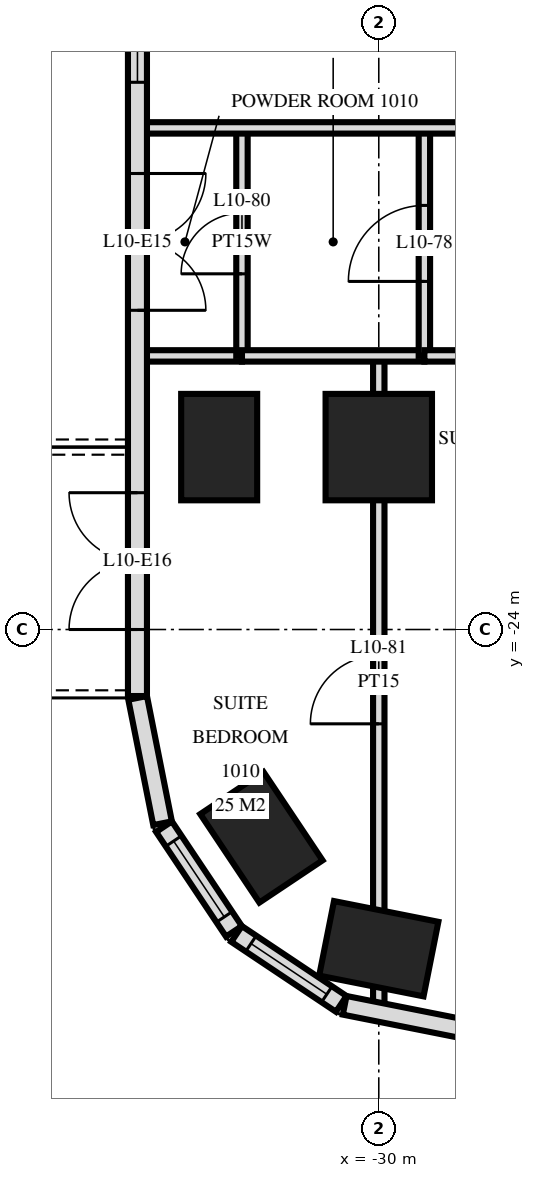
"""IFC4 building model, lengths in metres.
Left out: names, types, materials, properties, quantities, classifications, styles, units other than length and angle.
Written with IfcOpenShell. Run it as: python <this file> out.ifc"""

import sys

from ifc_helpers import new_model, si_unit, direction, frame, frame_2d, origin, origin_2d, place, context, subcontext, project, spatial, rectangle, extrude, element, fill, save


model = new_model("IFC4")
c1 = context("Model", 3, precision=1e-05, world=origin(), true_north=direction((0.0, 1.0)))
c2 = subcontext(c1, "Body", "Model", "MODEL_VIEW")
j1 = project(units=[si_unit("LENGTHUNIT", "METRE"), si_unit("PLANEANGLEUNIT", "RADIAN")], contexts=[c1])
p1 = place(None, origin())
s1 = spatial("IfcSite", under=j1, at=p1, CompositionType="ELEMENT")
p2 = place(p1, origin())
s2 = spatial("IfcBuilding", under=s1, at=p2, CompositionType="ELEMENT")
p3 = place(p2, frame((0.0, 0.0, 45.6)))
s3 = spatial("IfcBuildingStorey", under=s2, at=p3, CompositionType="ELEMENT", Elevation=45.6)
for number, where, z_axis, x_axis in (
    (1, (-32.1, -21.6, 0.0), (0.0, 0.0, 1.0), (0.0, 1.0, 0.0)),
    (2, (-31.544, -26.733, 0.0), (0.0, 0.0, 1.0), (-0.556, 0.831, 0.0)),
    (3, (-30.0, -28.2, 0.0), (0.0, 0.0, 1.0), (-0.981, 0.195, 0.0)),
):
    element("IfcColumn", number, at=place(p3, frame(where, z_axis=z_axis, x_axis=x_axis)), inside=s3, PredefinedType="COLUMN", context=c2, shape_type="SweptSolid", body=[
        extrude(rectangle(XDim=1.4, YDim=1.0, at=origin_2d()), origin(), (0.0, 0.0, 1.0), 3.6),
    ])
p4 = place(p3, frame((-30.0, -21.6, 0.0), z_axis=(0.0, 0.0, 1.0), x_axis=(1.0, 0.0, 0.0)))
e4 = element("IfcColumn", 4, at=p4, inside=s3, PredefinedType="COLUMN", context=c2, shape_type="SweptSolid", body=[
    extrude(rectangle(XDim=1.4, YDim=1.4, at=origin_2d()), origin(), (0.0, 0.0, 1.0), 3.6),
])
p5 = place(p3, frame((-33.175, -3.325, 0.0), z_axis=(0.0, 0.0, 1.0), x_axis=(0.0, -1.0, 0.0)))
e5 = element("IfcWall", 5, at=p5, inside=s3, PredefinedType="SOLIDWALL", context=c2, shape_type="SweptSolid", body=[
    extrude(rectangle(XDim=21.551, YDim=0.25, at=frame_2d((10.775, 0.0))), origin(), (0.0, 0.0, 1.0), 3.32),
])
p6 = place(p5, frame((6.65, 0.0, 0.0)))
e6 = element("IfcOpeningElement", 6, at=p6, cuts=e5, PredefinedType="OPENING", context=c2, shape_type="SweptSolid", body=[
    extrude(rectangle(XDim=1.8, YDim=2.4, at=frame_2d((0.9, 1.2))), frame((0.0, 0.135, 0.0), z_axis=(0.0, -1.0, 0.0), x_axis=(1.0, 0.0, 0.0)), (0.0, 0.0, 1.0), 0.27),
])
p7 = place(p5, frame((12.275, 0.0, 0.3)))
e7 = element("IfcOpeningElement", 7, at=p7, cuts=e5, PredefinedType="OPENING", context=c2, shape_type="SweptSolid", body=[
    extrude(rectangle(XDim=1.2, YDim=2.1, at=frame_2d((0.6, 1.05))), frame((0.0, 0.135, 0.0), z_axis=(0.0, -1.0, 0.0), x_axis=(1.0, 0.0, 0.0)), (0.0, 0.0, 1.0), 0.27),
])
p8 = place(p5, frame((14.675, 0.0, 0.0)))
e8 = element("IfcOpeningElement", 8, at=p8, cuts=e5, PredefinedType="OPENING", context=c2, shape_type="SweptSolid", body=[
    extrude(rectangle(XDim=1.8, YDim=2.4, at=frame_2d((0.9, 1.2))), frame((0.0, 0.135, 0.0), z_axis=(0.0, -1.0, 0.0), x_axis=(1.0, 0.0, 0.0)), (0.0, 0.0, 1.0), 0.27),
])
p9 = place(p5, frame((18.875, 0.0, 0.0)))
e9 = element("IfcOpeningElement", 9, at=p9, cuts=e5, PredefinedType="OPENING", context=c2, shape_type="SweptSolid", body=[
    extrude(rectangle(XDim=1.8, YDim=2.4, at=frame_2d((0.9, 1.2))), frame((0.0, 0.135, 0.0), z_axis=(0.0, -1.0, 0.0), x_axis=(1.0, 0.0, 0.0)), (0.0, 0.0, 1.0), 0.27),
])
p10 = place(p3, frame((-33.173, -24.9, 0.0), z_axis=(0.0, 0.0, 1.0), x_axis=(0.195166572128, -0.980770110232, 0.0)))
e10 = element("IfcWall", 10, at=p10, inside=s3, PredefinedType="SOLIDWALL", context=c2, shape_type="SweptSolid", body=[
    extrude(rectangle(XDim=1.681, YDim=0.25, at=frame_2d((0.841, 0.0))), origin(), (0.0, 0.0, 1.0), 3.32),
])
p11 = place(p3, frame((-32.826, -26.594, 0.0), z_axis=(0.0, 0.0, 1.0), x_axis=(0.55555029066, -0.831482937015, 0.0)))
e11 = element("IfcWall", 11, at=p11, inside=s3, PredefinedType="SOLIDWALL", context=c2, shape_type="SweptSolid", body=[
    extrude(rectangle(XDim=1.656, YDim=0.25, at=frame_2d((0.828, 0.0))), origin(), (0.0, 0.0, 1.0), 3.32),
])
p12 = place(p11, frame((0.228, 0.0, 0.9)))
e12 = element("IfcOpeningElement", 12, at=p12, cuts=e11, PredefinedType="OPENING", context=c2, shape_type="SweptSolid", body=[
    extrude(rectangle(XDim=1.2, YDim=1.5, at=frame_2d((0.6, 0.75))), frame((0.0, 0.135, 0.0), z_axis=(0.0, -1.0, 0.0), x_axis=(1.0, 0.0, 0.0)), (0.0, 0.0, 1.0), 0.27),
])
p13 = place(p3, frame((-31.871, -28.006, 0.0), z_axis=(0.0, 0.0, 1.0), x_axis=(0.831482937015, -0.55555029066, 0.0)))
e13 = element("IfcWall", 13, at=p13, inside=s3, PredefinedType="SOLIDWALL", context=c2, shape_type="SweptSolid", body=[
    extrude(rectangle(XDim=1.656, YDim=0.25, at=frame_2d((0.828, 0.0))), origin(), (0.0, 0.0, 1.0), 3.32),
])
p14 = place(p13, frame((0.228, 0.0, 0.9)))
e14 = element("IfcOpeningElement", 14, at=p14, cuts=e13, PredefinedType="OPENING", context=c2, shape_type="SweptSolid", body=[
    extrude(rectangle(XDim=1.2, YDim=1.5, at=frame_2d((0.6, 0.75))), frame((0.0, 0.135, 0.0), z_axis=(0.0, -1.0, 0.0), x_axis=(1.0, 0.0, 0.0)), (0.0, 0.0, 1.0), 0.27),
])
p15 = place(p3, frame((-30.449, -28.945, 0.0), z_axis=(0.0, 0.0, 1.0), x_axis=(0.980775640221, -0.19513878023, 0.0)))
e15 = element("IfcWall", 15, at=p15, inside=s3, PredefinedType="SOLIDWALL", context=c2, shape_type="SweptSolid", body=[
    extrude(rectangle(XDim=1.681, YDim=0.25, at=frame_2d((0.841, 0.0))), origin(), (0.0, 0.0, 1.0), 3.32),
])
p16 = place(p3, frame((-29.4, -20.4, 0.0), z_axis=(0.0, 0.0, 1.0), x_axis=(0.0, 1.0, 0.0)))
e16 = element("IfcWall", 16, at=p16, inside=s3, PredefinedType="PARTITIONING", context=c2, shape_type="SweptSolid", body=[
    extrude(rectangle(XDim=3.0, YDim=0.15, at=frame_2d((1.5, 0.0))), origin(), (0.0, 0.0, 1.0), 3.32),
])
p17 = place(p16, frame((0.98, 0.0, 0.0)))
e17 = element("IfcOpeningElement", 17, at=p17, cuts=e16, PredefinedType="OPENING", context=c2, shape_type="SweptSolid", body=[
    extrude(rectangle(XDim=1.0, YDim=2.1, at=frame_2d((0.5, 1.05))), frame((0.0, 0.085, 0.0), z_axis=(0.0, -1.0, 0.0), x_axis=(1.0, 0.0, 0.0)), (0.0, 0.0, 1.0), 0.17),
])
p18 = place(p3, frame((-30.0, -28.978, 0.0), z_axis=(0.0, 0.0, 1.0), x_axis=(0.0, 1.0, 0.0)))
e18 = element("IfcWall", 18, at=p18, inside=s3, PredefinedType="PARTITIONING", context=c2, shape_type="SweptSolid", body=[
    extrude(rectangle(XDim=8.578, YDim=0.15, at=frame_2d((4.289, 0.0))), origin(), (0.0, 0.0, 1.0), 3.32),
])
p19 = place(p18, frame((3.737, 0.0, 0.0)))
e19 = element("IfcOpeningElement", 19, at=p19, cuts=e18, PredefinedType="OPENING", context=c2, shape_type="SweptSolid", body=[
    extrude(rectangle(XDim=0.9, YDim=2.1, at=frame_2d((0.45, 1.05))), frame((0.0, 0.085, 0.0), z_axis=(0.0, -1.0, 0.0), x_axis=(1.0, 0.0, 0.0)), (0.0, 0.0, 1.0), 0.17),
])
p20 = place(p3, frame((-31.8, -20.4, 0.0), z_axis=(0.0, 0.0, 1.0), x_axis=(0.0, 1.0, 0.0)))
e20 = element("IfcWall", 20, at=p20, inside=s3, PredefinedType="PLUMBINGWALL", context=c2, shape_type="SweptSolid", body=[
    extrude(rectangle(XDim=3.0, YDim=0.15, at=frame_2d((1.5, 0.0))), origin(), (0.0, 0.0, 1.0), 3.32),
])
p21 = place(p20, frame((1.08, 0.0, 0.0)))
e21 = element("IfcOpeningElement", 21, at=p21, cuts=e20, PredefinedType="OPENING", context=c2, shape_type="SweptSolid", body=[
    extrude(rectangle(XDim=0.8, YDim=2.1, at=frame_2d((0.4, 1.05))), frame((0.0, 0.085, 0.0), z_axis=(0.0, -1.0, 0.0), x_axis=(1.0, 0.0, 0.0)), (0.0, 0.0, 1.0), 0.17),
])
p22 = place(p3, frame((-29.4, -20.4, 0.0), z_axis=(0.0, 0.0, 1.0), x_axis=(1.0, 0.0, 0.0)))
e22 = element("IfcWall", 22, at=p22, inside=s3, PredefinedType="PARTITIONING", context=c2, shape_type="SweptSolid", body=[
    extrude(rectangle(XDim=2.4, YDim=0.15, at=frame_2d((1.2, 0.0))), origin(), (0.0, 0.0, 1.0), 3.32),
])
p23 = place(p22, frame((0.68, 0.0, 0.0)))
e23 = element("IfcOpeningElement", 23, at=p23, cuts=e22, PredefinedType="OPENING", context=c2, shape_type="SweptSolid", body=[
    extrude(rectangle(XDim=1.0, YDim=2.1, at=frame_2d((0.5, 1.05))), frame((0.0, 0.085, 0.0), z_axis=(0.0, -1.0, 0.0), x_axis=(1.0, 0.0, 0.0)), (0.0, 0.0, 1.0), 0.17),
])
p24 = place(p3, frame((-31.8, -20.4, 0.0), z_axis=(0.0, 0.0, 1.0), x_axis=(1.0, 0.0, 0.0)))
e24 = element("IfcWall", 24, at=p24, inside=s3, PredefinedType="PARTITIONING", context=c2, shape_type="SweptSolid", body=[
    extrude(rectangle(XDim=2.4, YDim=0.15, at=frame_2d((1.2, 0.0))), origin(), (0.0, 0.0, 1.0), 3.32),
])
p25 = place(p3, frame((-33.12, -20.4, 0.0), z_axis=(0.0, 0.0, 1.0), x_axis=(1.0, 0.0, 0.0)))
e25 = element("IfcWall", 25, at=p25, inside=s3, PredefinedType="PLUMBINGWALL", context=c2, shape_type="SweptSolid", body=[
    extrude(rectangle(XDim=1.32, YDim=0.15, at=frame_2d((0.66, 0.0))), origin(), (0.0, 0.0, 1.0), 3.32),
])
p26 = place(p3, frame((-33.12, -17.4, 0.0), z_axis=(0.0, 0.0, 1.0), x_axis=(1.0, 0.0, 0.0)))
e26 = element("IfcWall", 26, at=p26, inside=s3, PredefinedType="PARTITIONING", context=c2, shape_type="SweptSolid", body=[
    extrude(rectangle(XDim=66.24, YDim=0.15, at=frame_2d((33.12, 0.0))), origin(), (0.0, 0.0, 1.0), 3.32),
])
p27 = place(p26, frame((9.27, 0.0, 0.0)))
e27 = element("IfcOpeningElement", 27, at=p27, cuts=e26, PredefinedType="OPENING", context=c2, shape_type="SweptSolid", body=[
    extrude(rectangle(XDim=1.0, YDim=2.1, at=frame_2d((0.5, 1.05))), frame((0.0, 0.085, 0.0), z_axis=(0.0, -1.0, 0.0), x_axis=(1.0, 0.0, 0.0)), (0.0, 0.0, 1.0), 0.17),
])
p28 = place(p26, frame((13.97, 0.0, 0.0)))
e28 = element("IfcOpeningElement", 28, at=p28, cuts=e26, PredefinedType="OPENING", context=c2, shape_type="SweptSolid", body=[
    extrude(rectangle(XDim=1.0, YDim=2.1, at=frame_2d((0.5, 1.05))), frame((0.0, 0.085, 0.0), z_axis=(0.0, -1.0, 0.0), x_axis=(1.0, 0.0, 0.0)), (0.0, 0.0, 1.0), 0.17),
])
p29 = place(p26, frame((17.62, 0.0, 0.0)))
e29 = element("IfcOpeningElement", 29, at=p29, cuts=e26, PredefinedType="OPENING", context=c2, shape_type="SweptSolid", body=[
    extrude(rectangle(XDim=1.0, YDim=2.1, at=frame_2d((0.5, 1.05))), frame((0.0, 0.085, 0.0), z_axis=(0.0, -1.0, 0.0), x_axis=(1.0, 0.0, 0.0)), (0.0, 0.0, 1.0), 0.17),
])
p30 = place(p26, frame((21.27, 0.0, 0.0)))
e30 = element("IfcOpeningElement", 30, at=p30, cuts=e26, PredefinedType="OPENING", context=c2, shape_type="SweptSolid", body=[
    extrude(rectangle(XDim=1.0, YDim=2.1, at=frame_2d((0.5, 1.05))), frame((0.0, 0.085, 0.0), z_axis=(0.0, -1.0, 0.0), x_axis=(1.0, 0.0, 0.0)), (0.0, 0.0, 1.0), 0.17),
])
p31 = place(p26, frame((25.97, 0.0, 0.0)))
e31 = element("IfcOpeningElement", 31, at=p31, cuts=e26, PredefinedType="OPENING", context=c2, shape_type="SweptSolid", body=[
    extrude(rectangle(XDim=1.0, YDim=2.1, at=frame_2d((0.5, 1.05))), frame((0.0, 0.085, 0.0), z_axis=(0.0, -1.0, 0.0), x_axis=(1.0, 0.0, 0.0)), (0.0, 0.0, 1.0), 0.17),
])
p32 = place(p26, frame((35.62, 0.0, 0.0)))
e32 = element("IfcOpeningElement", 32, at=p32, cuts=e26, PredefinedType="OPENING", context=c2, shape_type="SweptSolid", body=[
    extrude(rectangle(XDim=1.0, YDim=2.1, at=frame_2d((0.5, 1.05))), frame((0.0, 0.085, 0.0), z_axis=(0.0, -1.0, 0.0), x_axis=(1.0, 0.0, 0.0)), (0.0, 0.0, 1.0), 0.17),
])
p33 = place(p26, frame((40.97, 0.0, 0.0)))
e33 = element("IfcOpeningElement", 33, at=p33, cuts=e26, PredefinedType="OPENING", context=c2, shape_type="SweptSolid", body=[
    extrude(rectangle(XDim=1.0, YDim=2.1, at=frame_2d((0.5, 1.05))), frame((0.0, 0.085, 0.0), z_axis=(0.0, -1.0, 0.0), x_axis=(1.0, 0.0, 0.0)), (0.0, 0.0, 1.0), 0.17),
])
p34 = place(p26, frame((42.27, 0.0, 0.0)))
e34 = element("IfcOpeningElement", 34, at=p34, cuts=e26, PredefinedType="OPENING", context=c2, shape_type="SweptSolid", body=[
    extrude(rectangle(XDim=1.0, YDim=2.1, at=frame_2d((0.5, 1.05))), frame((0.0, 0.085, 0.0), z_axis=(0.0, -1.0, 0.0), x_axis=(1.0, 0.0, 0.0)), (0.0, 0.0, 1.0), 0.17),
])
p35 = place(p26, frame((49.72, 0.0, 0.0)))
e35 = element("IfcOpeningElement", 35, at=p35, cuts=e26, PredefinedType="OPENING", context=c2, shape_type="SweptSolid", body=[
    extrude(rectangle(XDim=1.0, YDim=2.1, at=frame_2d((0.5, 1.05))), frame((0.0, 0.085, 0.0), z_axis=(0.0, -1.0, 0.0), x_axis=(1.0, 0.0, 0.0)), (0.0, 0.0, 1.0), 0.17),
])
p36 = place(p26, frame((51.27, 0.0, 0.0)))
e36 = element("IfcOpeningElement", 36, at=p36, cuts=e26, PredefinedType="OPENING", context=c2, shape_type="SweptSolid", body=[
    extrude(rectangle(XDim=1.0, YDim=2.1, at=frame_2d((0.5, 1.05))), frame((0.0, 0.085, 0.0), z_axis=(0.0, -1.0, 0.0), x_axis=(1.0, 0.0, 0.0)), (0.0, 0.0, 1.0), 0.17),
])
p37 = place(p26, frame((4.42, 0.0, 0.0)))
e37 = element("IfcOpeningElement", 37, at=p37, cuts=e26, PredefinedType="OPENING", context=c2, shape_type="SweptSolid", body=[
    extrude(rectangle(XDim=1.0, YDim=2.1, at=frame_2d((0.5, 1.05))), frame((0.0, 0.085, 0.0), z_axis=(0.0, -1.0, 0.0), x_axis=(1.0, 0.0, 0.0)), (0.0, 0.0, 1.0), 0.17),
])
p38 = place(p26, frame((54.82, 0.0, 0.0)))
e38 = element("IfcOpeningElement", 38, at=p38, cuts=e26, PredefinedType="OPENING", context=c2, shape_type="SweptSolid", body=[
    extrude(rectangle(XDim=1.0, YDim=2.1, at=frame_2d((0.5, 1.05))), frame((0.0, 0.085, 0.0), z_axis=(0.0, -1.0, 0.0), x_axis=(1.0, 0.0, 0.0)), (0.0, 0.0, 1.0), 0.17),
])
p39 = place(p12, origin())
e39 = element("IfcWindow", 39, at=p39, inside=s3, PartitioningType="SINGLE_PANEL", PredefinedType="WINDOW", context=c2, shape_type="SweptSolid", body=[
    extrude(rectangle(XDim=1.2, YDim=1.5, at=frame_2d((0.6, 0.75))), frame((0.0, 0.03, 0.0), z_axis=(0.0, -1.0, 0.0), x_axis=(1.0, 0.0, 0.0)), (0.0, 0.0, 1.0), 0.06),
])
fill(e12, e39)
p40 = place(p14, origin())
e40 = element("IfcWindow", 40, at=p40, inside=s3, PartitioningType="SINGLE_PANEL", PredefinedType="WINDOW", context=c2, shape_type="SweptSolid", body=[
    extrude(rectangle(XDim=1.2, YDim=1.5, at=frame_2d((0.6, 0.75))), frame((0.0, 0.03, 0.0), z_axis=(0.0, -1.0, 0.0), x_axis=(1.0, 0.0, 0.0)), (0.0, 0.0, 1.0), 0.06),
])
fill(e14, e40)
p41 = place(p7, origin())
e41 = element("IfcWindow", 41, at=p41, inside=s3, PartitioningType="SINGLE_PANEL", PredefinedType="WINDOW", context=c2, shape_type="SweptSolid", body=[
    extrude(rectangle(XDim=1.2, YDim=2.1, at=frame_2d((0.6, 1.05))), frame((0.0, 0.03, 0.0), z_axis=(0.0, -1.0, 0.0), x_axis=(1.0, 0.0, 0.0)), (0.0, 0.0, 1.0), 0.06),
])
fill(e7, e41)
p42 = place(p8, origin())
e42 = element("IfcDoor", 42, at=p42, inside=s3, OperationType="DOUBLE_DOOR_SINGLE_SWING", PredefinedType="DOOR", context=c2, shape_type="SweptSolid", body=[
    extrude(rectangle(XDim=1.8, YDim=2.4, at=frame_2d((0.9, 1.2))), frame((0.0, 0.025, 0.0), z_axis=(0.0, -1.0, 0.0), x_axis=(1.0, 0.0, 0.0)), (0.0, 0.0, 1.0), 0.05),
])
fill(e8, e42)
p43 = place(p9, frame((0.9, 0.0, 0.0), z_axis=(0.0, 0.0, 1.0), x_axis=(-1.0, 0.0, 0.0)))
e43 = element("IfcDoor", 43, at=p43, inside=s3, OperationType="DOUBLE_DOOR_SINGLE_SWING", PredefinedType="DOOR", context=c2, shape_type="SweptSolid", body=[
    extrude(rectangle(XDim=1.8, YDim=2.4, at=frame_2d((0.0, 1.2))), frame((0.0, -0.025, 0.0), z_axis=(0.0, 1.0, 0.0), x_axis=(-1.0, 0.0, 0.0)), (0.0, 0.0, 1.0), 0.05),
])
fill(e9, e43)
p44 = place(p17, origin())
e44 = element("IfcDoor", 44, at=p44, inside=s3, OperationType="SINGLE_SWING_RIGHT", PredefinedType="DOOR", context=c2, shape_type="SweptSolid", body=[
    extrude(rectangle(XDim=1.0, YDim=2.1, at=frame_2d((0.5, 1.05))), frame((0.0, 0.025, 0.0), z_axis=(0.0, -1.0, 0.0), x_axis=(1.0, 0.0, 0.0)), (0.0, 0.0, 1.0), 0.05),
])
fill(e17, e44)
p45 = place(p21, origin())
e45 = element("IfcDoor", 45, at=p45, inside=s3, OperationType="SINGLE_SWING_RIGHT", PredefinedType="DOOR", context=c2, shape_type="SweptSolid", body=[
    extrude(rectangle(XDim=0.8, YDim=2.1, at=frame_2d((0.4, 1.05))), frame((0.0, 0.025, 0.0), z_axis=(0.0, -1.0, 0.0), x_axis=(1.0, 0.0, 0.0)), (0.0, 0.0, 1.0), 0.05),
])
fill(e21, e45)
p46 = place(p19, origin())
e46 = element("IfcDoor", 46, at=p46, inside=s3, OperationType="SINGLE_SWING_RIGHT", PredefinedType="DOOR", context=c2, shape_type="SweptSolid", body=[
    extrude(rectangle(XDim=0.9, YDim=2.1, at=frame_2d((0.45, 1.05))), frame((0.0, 0.025, 0.0), z_axis=(0.0, -1.0, 0.0), x_axis=(1.0, 0.0, 0.0)), (0.0, 0.0, 1.0), 0.05),
])
fill(e19, e46)
save(model, sys.argv[1])
